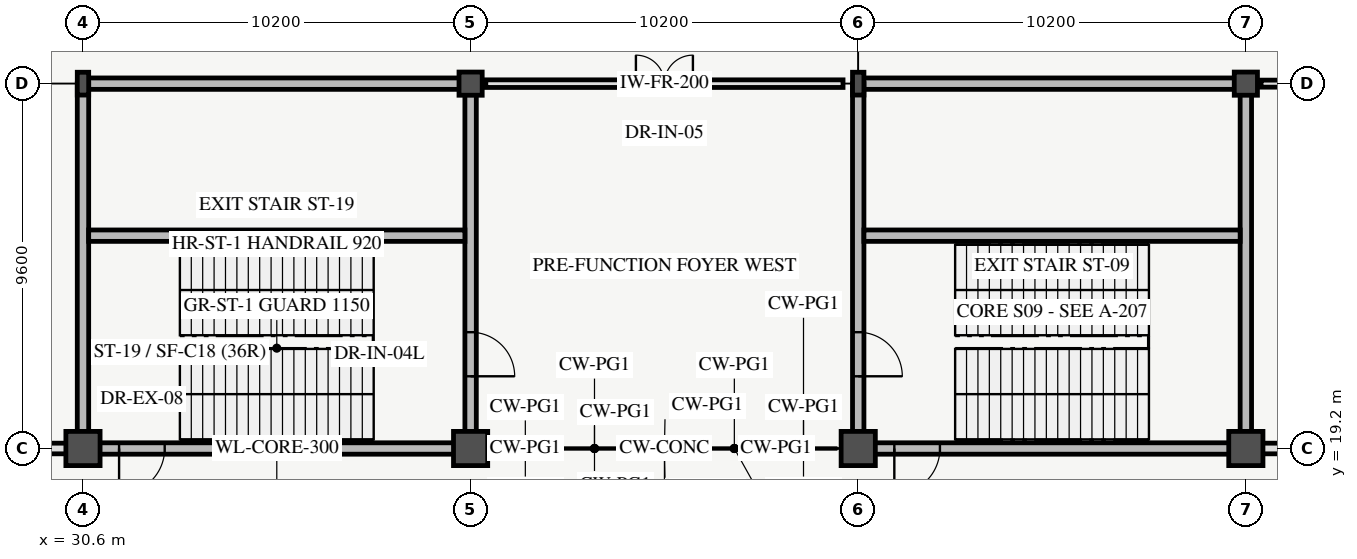
"""IFC4 building model, lengths in metres.
Left out: names, types, materials, properties, quantities, classifications, styles, units other than length and angle.
Written with IfcOpenShell. Run it as: python <this file> out.ifc"""

import sys

from ifc_helpers import new_model, si_unit, direction, frame, frame_2d, origin, origin_2d, place, context, subcontext, project, spatial, rectangle, hollow_circle, i_section, extrude, element, fill, save


model = new_model("IFC4")
c1 = context("Model", 3, precision=1e-05, world=origin(), true_north=direction((0.0, 1.0)))
c2 = subcontext(c1, "Body", "Model", "MODEL_VIEW")
j1 = project(units=[si_unit("LENGTHUNIT", "METRE"), si_unit("PLANEANGLEUNIT", "RADIAN")], contexts=[c1])
p1 = place(None, origin())
s1 = spatial("IfcSite", under=j1, at=p1, CompositionType="ELEMENT")
p2 = place(p1, origin())
s2 = spatial("IfcBuilding", under=s1, at=p2, CompositionType="ELEMENT")
p3 = place(p2, origin())
s3 = spatial("IfcBuildingStorey", under=s2, at=p3, CompositionType="ELEMENT", Elevation=0.0)
p4 = place(p3, frame((30.6, 19.2, 0.0), z_axis=(0.0, 0.0, 1.0), x_axis=(1.0, 0.0, 0.0)))
e1 = element("IfcColumn", 1, at=p4, inside=s3, PredefinedType="COLUMN", context=c2, shape_type="SweptSolid", body=[
    extrude(rectangle(XDim=0.9, YDim=0.9, at=origin_2d()), origin(), (0.0, 0.0, 1.0), 5.4),
])
p5 = place(p3, frame((30.6, 28.8, 0.0), z_axis=(0.0, 0.0, 1.0), x_axis=(1.0, 0.0, 0.0)))
e2 = element("IfcColumn", 2, at=p5, inside=s3, PredefinedType="COLUMN", context=c2, shape_type="SweptSolid", body=[
    extrude(i_section(OverallWidth=0.3, OverallDepth=0.6, WebThickness=0.015, FlangeThickness=0.03, FilletRadius=0.027, at=origin_2d()), origin(), (0.0, 0.0, 1.0), 5.4),
])
p6 = place(p3, frame((40.8, 19.2, 0.0), z_axis=(0.0, 0.0, 1.0), x_axis=(1.0, 0.0, 0.0)))
e3 = element("IfcColumn", 3, at=p6, inside=s3, PredefinedType="COLUMN", context=c2, shape_type="SweptSolid", body=[
    extrude(rectangle(XDim=0.9, YDim=0.9, at=origin_2d()), origin(), (0.0, 0.0, 1.0), 5.4),
])
p7 = place(p3, frame((40.8, 28.8, 0.0), z_axis=(0.0, 0.0, 1.0), x_axis=(1.0, 0.0, 0.0)))
e4 = element("IfcColumn", 4, at=p7, inside=s3, PredefinedType="COLUMN", context=c2, shape_type="SweptSolid", body=[
    extrude(hollow_circle(Radius=0.305, WallThickness=0.025, at=origin_2d()), origin(), (0.0, 0.0, 1.0), 5.4),
])
p8 = place(p3, frame((51.0, 19.2, 0.0), z_axis=(0.0, 0.0, 1.0), x_axis=(1.0, 0.0, 0.0)))
e5 = element("IfcColumn", 5, at=p8, inside=s3, PredefinedType="COLUMN", context=c2, shape_type="SweptSolid", body=[
    extrude(rectangle(XDim=0.9, YDim=0.9, at=origin_2d()), origin(), (0.0, 0.0, 1.0), 5.4),
])
p9 = place(p3, frame((51.0, 28.8, 0.0), z_axis=(0.0, 0.0, 1.0), x_axis=(1.0, 0.0, 0.0)))
e6 = element("IfcColumn", 6, at=p9, inside=s3, PredefinedType="COLUMN", context=c2, shape_type="SweptSolid", body=[
    extrude(i_section(OverallWidth=0.3, OverallDepth=0.6, WebThickness=0.015, FlangeThickness=0.03, FilletRadius=0.027, at=origin_2d()), origin(), (0.0, 0.0, 1.0), 5.4),
])
p10 = place(p3, frame((61.2, 19.2, 0.0), z_axis=(0.0, 0.0, 1.0), x_axis=(1.0, 0.0, 0.0)))
e7 = element("IfcColumn", 7, at=p10, inside=s3, PredefinedType="COLUMN", context=c2, shape_type="SweptSolid", body=[
    extrude(rectangle(XDim=0.9, YDim=0.9, at=origin_2d()), origin(), (0.0, 0.0, 1.0), 5.4),
])
p11 = place(p3, frame((61.2, 28.8, 0.0), z_axis=(0.0, 0.0, 1.0), x_axis=(1.0, 0.0, 0.0)))
e8 = element("IfcColumn", 8, at=p11, inside=s3, PredefinedType="COLUMN", context=c2, shape_type="SweptSolid", body=[
    extrude(hollow_circle(Radius=0.305, WallThickness=0.025, at=origin_2d()), origin(), (0.0, 0.0, 1.0), 5.4),
])
p12 = place(p3, frame((20.64, 19.2, 0.0), z_axis=(0.0, 0.0, 1.0), x_axis=(1.0, 0.0, 0.0)))
e9 = element("IfcWall", 9, at=p12, inside=s3, PredefinedType="STANDARD", context=c2, shape_type="SweptSolid", body=[
    extrude(rectangle(XDim=9.72, YDim=0.28, at=frame_2d((4.86, 0.0))), origin(), (0.0, 0.0, 1.0), 3.68),
])
p13 = place(p12, frame((1.027, 0.0, 0.0)))
e10 = element("IfcOpeningElement", 10, at=p13, cuts=e9, PredefinedType="OPENING", context=c2, shape_type="SweptSolid", body=[
    extrude(rectangle(XDim=3.0, YDim=2.5, at=frame_2d((1.5, 1.25))), frame((0.0, 0.15, 0.0), z_axis=(0.0, -1.0, 0.0), x_axis=(1.0, 0.0, 0.0)), (0.0, 0.0, 1.0), 0.3),
])
p14 = place(p12, frame((5.198, 0.0, 0.85)))
e11 = element("IfcOpeningElement", 11, at=p14, cuts=e9, PredefinedType="OPENING", context=c2, shape_type="SweptSolid", body=[
    extrude(rectangle(XDim=3.6, YDim=2.1, at=frame_2d((1.8, 1.05))), frame((0.0, 0.15, 0.0), z_axis=(0.0, -1.0, 0.0), x_axis=(1.0, 0.0, 0.0)), (0.0, 0.0, 1.0), 0.3),
])
p15 = place(p3, frame((61.44, 19.2, 0.0), z_axis=(0.0, 0.0, 1.0), x_axis=(1.0, 0.0, 0.0)))
e12 = element("IfcWall", 12, at=p15, inside=s3, PredefinedType="STANDARD", context=c2, shape_type="SweptSolid", body=[
    extrude(rectangle(XDim=9.72, YDim=0.28, at=frame_2d((4.86, 0.0))), origin(), (0.0, 0.0, 1.0), 3.68),
])
p16 = place(p15, frame((1.027, 0.0, 0.0)))
e13 = element("IfcOpeningElement", 13, at=p16, cuts=e12, PredefinedType="OPENING", context=c2, shape_type="SweptSolid", body=[
    extrude(rectangle(XDim=3.0, YDim=2.5, at=frame_2d((1.5, 1.25))), frame((0.0, 0.15, 0.0), z_axis=(0.0, -1.0, 0.0), x_axis=(1.0, 0.0, 0.0)), (0.0, 0.0, 1.0), 0.3),
])
p17 = place(p15, frame((5.198, 0.0, 0.85)))
e14 = element("IfcOpeningElement", 14, at=p17, cuts=e12, PredefinedType="OPENING", context=c2, shape_type="SweptSolid", body=[
    extrude(rectangle(XDim=3.6, YDim=2.1, at=frame_2d((1.8, 1.05))), frame((0.0, 0.15, 0.0), z_axis=(0.0, -1.0, 0.0), x_axis=(1.0, 0.0, 0.0)), (0.0, 0.0, 1.0), 0.3),
])
p18 = place(p3, frame((51.0, 19.2, 0.0), z_axis=(0.0, 0.0, 1.0), x_axis=(1.0, 0.0, 0.0)))
e15 = element("IfcWall", 15, at=p18, inside=s3, PredefinedType="SHEAR", context=c2, shape_type="SweptSolid", body=[
    extrude(rectangle(XDim=10.2, YDim=0.3, at=frame_2d((5.1, 0.0))), origin(), (0.0, 0.0, 1.0), 5.4),
])
p19 = place(p18, frame((0.95, 0.0, 0.0)))
e16 = element("IfcOpeningElement", 16, at=p19, cuts=e15, PredefinedType="OPENING", context=c2, shape_type="SweptSolid", body=[
    extrude(rectangle(XDim=1.2, YDim=2.2, at=frame_2d((0.6, 1.1))), frame((0.0, 0.16, 0.0), z_axis=(0.0, -1.0, 0.0), x_axis=(1.0, 0.0, 0.0)), (0.0, 0.0, 1.0), 0.32),
])
p20 = place(p3, frame((51.0, 28.8, 0.0), z_axis=(0.0, 0.0, 1.0), x_axis=(1.0, 0.0, 0.0)))
e17 = element("IfcWall", 17, at=p20, inside=s3, PredefinedType="SHEAR", context=c2, shape_type="SweptSolid", body=[
    extrude(rectangle(XDim=10.2, YDim=0.3, at=frame_2d((5.1, 0.0))), origin(), (0.0, 0.0, 1.0), 5.4),
])
p21 = place(p3, frame((51.0, 19.2, 0.0), z_axis=(0.0, 0.0, 1.0), x_axis=(0.0, 1.0, 0.0)))
e18 = element("IfcWall", 18, at=p21, inside=s3, PredefinedType="SHEAR", context=c2, shape_type="SweptSolid", body=[
    extrude(rectangle(XDim=9.6, YDim=0.3, at=frame_2d((4.8, 0.0))), origin(), (0.0, 0.0, 1.0), 5.4),
])
p22 = place(p21, frame((1.9, 0.0, 0.0)))
e19 = element("IfcOpeningElement", 19, at=p22, cuts=e18, PredefinedType="OPENING", context=c2, shape_type="SweptSolid", body=[
    extrude(rectangle(XDim=1.16, YDim=2.2, at=frame_2d((0.58, 1.1))), frame((0.0, 0.16, 0.0), z_axis=(0.0, -1.0, 0.0), x_axis=(1.0, 0.0, 0.0)), (0.0, 0.0, 1.0), 0.32),
])
p23 = place(p3, frame((61.2, 19.2, 0.0), z_axis=(0.0, 0.0, 1.0), x_axis=(0.0, 1.0, 0.0)))
e20 = element("IfcWall", 20, at=p23, inside=s3, PredefinedType="SHEAR", context=c2, shape_type="SweptSolid", body=[
    extrude(rectangle(XDim=9.6, YDim=0.3, at=frame_2d((4.8, 0.0))), origin(), (0.0, 0.0, 1.0), 5.4),
])
p24 = place(p3, frame((51.15, 24.8, 0.0), z_axis=(0.0, 0.0, 1.0), x_axis=(1.0, 0.0, 0.0)))
e21 = element("IfcWall", 21, at=p24, inside=s3, PredefinedType="SHEAR", context=c2, shape_type="SweptSolid", body=[
    extrude(rectangle(XDim=9.9, YDim=0.3, at=frame_2d((4.95, 0.0))), origin(), (0.0, 0.0, 1.0), 5.4),
])
p25 = place(p3, frame((30.6, 19.2, 0.0), z_axis=(0.0, 0.0, 1.0), x_axis=(1.0, 0.0, 0.0)))
e22 = element("IfcWall", 22, at=p25, inside=s3, PredefinedType="SHEAR", context=c2, shape_type="SweptSolid", body=[
    extrude(rectangle(XDim=10.2, YDim=0.3, at=frame_2d((5.1, 0.0))), origin(), (0.0, 0.0, 1.0), 5.4),
])
p26 = place(p25, frame((0.95, 0.0, 0.0)))
e23 = element("IfcOpeningElement", 23, at=p26, cuts=e22, PredefinedType="OPENING", context=c2, shape_type="SweptSolid", body=[
    extrude(rectangle(XDim=1.2, YDim=2.2, at=frame_2d((0.6, 1.1))), frame((0.0, 0.16, 0.0), z_axis=(0.0, -1.0, 0.0), x_axis=(1.0, 0.0, 0.0)), (0.0, 0.0, 1.0), 0.32),
])
p27 = place(p3, frame((30.6, 28.8, 0.0), z_axis=(0.0, 0.0, 1.0), x_axis=(1.0, 0.0, 0.0)))
e24 = element("IfcWall", 24, at=p27, inside=s3, PredefinedType="SHEAR", context=c2, shape_type="SweptSolid", body=[
    extrude(rectangle(XDim=10.2, YDim=0.3, at=frame_2d((5.1, 0.0))), origin(), (0.0, 0.0, 1.0), 5.4),
])
p28 = place(p3, frame((30.6, 19.2, 0.0), z_axis=(0.0, 0.0, 1.0), x_axis=(0.0, 1.0, 0.0)))
e25 = element("IfcWall", 25, at=p28, inside=s3, PredefinedType="SHEAR", context=c2, shape_type="SweptSolid", body=[
    extrude(rectangle(XDim=9.6, YDim=0.3, at=frame_2d((4.8, 0.0))), origin(), (0.0, 0.0, 1.0), 5.4),
])
p29 = place(p3, frame((40.8, 19.2, 0.0), z_axis=(0.0, 0.0, 1.0), x_axis=(0.0, 1.0, 0.0)))
e26 = element("IfcWall", 26, at=p29, inside=s3, PredefinedType="SHEAR", context=c2, shape_type="SweptSolid", body=[
    extrude(rectangle(XDim=9.6, YDim=0.3, at=frame_2d((4.8, 0.0))), origin(), (0.0, 0.0, 1.0), 5.4),
])
p30 = place(p29, frame((1.9, 0.0, 0.0)))
e27 = element("IfcOpeningElement", 27, at=p30, cuts=e26, PredefinedType="OPENING", context=c2, shape_type="SweptSolid", body=[
    extrude(rectangle(XDim=1.16, YDim=2.2, at=frame_2d((0.58, 1.1))), frame((0.0, 0.16, 0.0), z_axis=(0.0, -1.0, 0.0), x_axis=(1.0, 0.0, 0.0)), (0.0, 0.0, 1.0), 0.32),
])
p31 = place(p3, frame((30.75, 24.8, 0.0), z_axis=(0.0, 0.0, 1.0), x_axis=(1.0, 0.0, 0.0)))
e28 = element("IfcWall", 28, at=p31, inside=s3, PredefinedType="SHEAR", context=c2, shape_type="SweptSolid", body=[
    extrude(rectangle(XDim=9.9, YDim=0.3, at=frame_2d((4.95, 0.0))), origin(), (0.0, 0.0, 1.0), 5.4),
])
p32 = place(p3, frame((41.2, 28.8, 0.0), z_axis=(0.0, 0.0, 1.0), x_axis=(1.0, 0.0, 0.0)))
e29 = element("IfcWall", 29, at=p32, inside=s3, PredefinedType="PARTITIONING", context=c2, shape_type="SweptSolid", body=[
    extrude(rectangle(XDim=9.4, YDim=0.2, at=frame_2d((4.7, 0.0))), origin(), (0.0, 0.0, 1.0), 4.08),
])
p33 = place(p32, frame((3.95, 0.0, 0.0)))
e30 = element("IfcOpeningElement", 30, at=p33, cuts=e29, PredefinedType="OPENING", context=c2, shape_type="SweptSolid", body=[
    extrude(rectangle(XDim=1.5, YDim=2.25, at=frame_2d((0.75, 1.125))), frame((0.0, 0.11, 0.0), z_axis=(0.0, -1.0, 0.0), x_axis=(1.0, 0.0, 0.0)), (0.0, 0.0, 1.0), 0.22),
])
p34 = place(p3, frame((61.6, 28.8, 0.0), z_axis=(0.0, 0.0, 1.0), x_axis=(1.0, 0.0, 0.0)))
e31 = element("IfcWall", 31, at=p34, inside=s3, PredefinedType="PARTITIONING", context=c2, shape_type="SweptSolid", body=[
    extrude(rectangle(XDim=9.4, YDim=0.185, at=frame_2d((4.7, 0.0))), origin(), (0.0, 0.0, 1.0), 4.08),
])
p35 = place(p34, frame((3.85, 0.0, 0.0)))
e32 = element("IfcOpeningElement", 32, at=p35, cuts=e31, PredefinedType="OPENING", context=c2, shape_type="SweptSolid", body=[
    extrude(rectangle(XDim=1.7, YDim=2.3, at=frame_2d((0.85, 1.15))), frame((0.0, 0.103, 0.0), z_axis=(0.0, -1.0, 0.0), x_axis=(1.0, 0.0, 0.0)), (0.0, 0.0, 1.0), 0.205),
])
p36 = place(p22, origin())
e33 = element("IfcDoor", 33, at=p36, inside=s3, OperationType="SINGLE_SWING_LEFT", PredefinedType="DOOR", context=c2, shape_type="SweptSolid", body=[
    extrude(rectangle(XDim=1.16, YDim=2.2, at=frame_2d((0.58, 1.1))), frame((0.0, 0.025, 0.0), z_axis=(0.0, -1.0, 0.0), x_axis=(1.0, 0.0, 0.0)), (0.0, 0.0, 1.0), 0.05),
])
fill(e19, e33)
p37 = place(p19, frame((1.2, 0.0, 0.0), z_axis=(0.0, 0.0, 1.0), x_axis=(-1.0, 0.0, 0.0)))
e34 = element("IfcDoor", 34, at=p37, inside=s3, OperationType="SINGLE_SWING_LEFT", PredefinedType="DOOR", context=c2, shape_type="SweptSolid", body=[
    extrude(rectangle(XDim=1.2, YDim=2.2, at=frame_2d((0.6, 1.1))), frame((0.0, 0.025, 0.0), z_axis=(0.0, -1.0, 0.0), x_axis=(1.0, 0.0, 0.0)), (0.0, 0.0, 1.0), 0.05),
])
fill(e16, e34)
p38 = place(p30, origin())
e35 = element("IfcDoor", 35, at=p38, inside=s3, OperationType="SINGLE_SWING_LEFT", PredefinedType="DOOR", context=c2, shape_type="SweptSolid", body=[
    extrude(rectangle(XDim=1.16, YDim=2.2, at=frame_2d((0.58, 1.1))), frame((0.0, 0.025, 0.0), z_axis=(0.0, -1.0, 0.0), x_axis=(1.0, 0.0, 0.0)), (0.0, 0.0, 1.0), 0.05),
])
fill(e27, e35)
p39 = place(p26, frame((1.2, 0.0, 0.0), z_axis=(0.0, 0.0, 1.0), x_axis=(-1.0, 0.0, 0.0)))
e36 = element("IfcDoor", 36, at=p39, inside=s3, OperationType="SINGLE_SWING_LEFT", PredefinedType="DOOR", context=c2, shape_type="SweptSolid", body=[
    extrude(rectangle(XDim=1.2, YDim=2.2, at=frame_2d((0.6, 1.1))), frame((0.0, 0.025, 0.0), z_axis=(0.0, -1.0, 0.0), x_axis=(1.0, 0.0, 0.0)), (0.0, 0.0, 1.0), 0.05),
])
fill(e23, e36)
p40 = place(p33, origin())
e37 = element("IfcDoor", 37, at=p40, inside=s3, OperationType="DOUBLE_DOOR_SINGLE_SWING", PredefinedType="DOOR", context=c2, shape_type="SweptSolid", body=[
    extrude(rectangle(XDim=1.5, YDim=2.25, at=frame_2d((0.75, 1.125))), frame((0.0, 0.025, 0.0), z_axis=(0.0, -1.0, 0.0), x_axis=(1.0, 0.0, 0.0)), (0.0, 0.0, 1.0), 0.05),
])
fill(e30, e37)
save(model, sys.argv[1])
